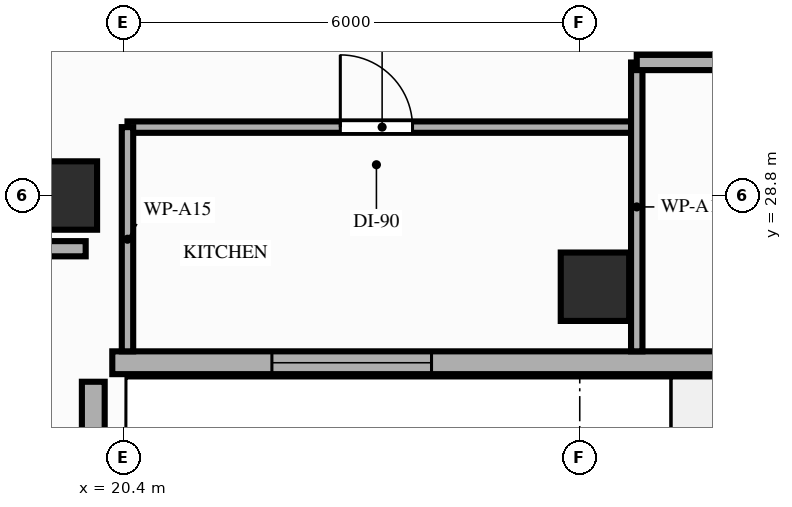
"""IFC4 building model, lengths in metres.
Left out: names, types, materials, properties, quantities, classifications, styles, units other than length and angle.
Written with IfcOpenShell. Run it as: python <this file> out.ifc"""

import sys

from ifc_helpers import new_model, si_unit, direction, frame, frame_2d, origin, origin_2d, place, context, subcontext, project, spatial, rectangle, extrude, element, fill, save


model = new_model("IFC4")
c1 = context("Model", 3, precision=1e-05, world=origin(), true_north=direction((0.0, 1.0)))
c2 = subcontext(c1, "Body", "Model", "MODEL_VIEW")
j1 = project(units=[si_unit("LENGTHUNIT", "METRE"), si_unit("PLANEANGLEUNIT", "RADIAN")], contexts=[c1])
p1 = place(None, origin())
s1 = spatial("IfcSite", under=j1, at=p1, CompositionType="ELEMENT")
p2 = place(p1, origin())
s2 = spatial("IfcBuilding", under=s1, at=p2, CompositionType="ELEMENT")
p3 = place(p2, frame((0.0, 0.0, 179.2)))
s3 = spatial("IfcBuildingStorey", under=s2, at=p3, CompositionType="ELEMENT", Elevation=179.2)
for number, where, z_axis, x_axis in (
    (1, (19.6, 28.8, 0.0), (0.0, 0.0, 1.0), (1.0, 0.0, 0.0)),
    (2, (26.6, 27.6, 0.0), (0.0, 0.0, 1.0), (1.0, 0.0, 0.0)),
):
    element("IfcColumn", number, at=place(p3, frame(where, z_axis=z_axis, x_axis=x_axis)), inside=s3, PredefinedType="COLUMN", context=c2, shape_type="SweptSolid", body=[
        extrude(rectangle(XDim=0.9, YDim=0.9, at=origin_2d()), origin(), (0.0, 0.0, 1.0), 3.2),
    ])
p4 = place(p3, frame((20.0, 8.8, 0.0), z_axis=(0.0, 0.0, 1.0), x_axis=(0.0, 1.0, 0.0)))
e3 = element("IfcWall", 3, at=p4, inside=s3, PredefinedType="STANDARD", context=c2, shape_type="SweptSolid", body=[
    extrude(rectangle(XDim=17.55, YDim=0.3, at=frame_2d((8.775, 0.0))), origin(), (0.0, 0.0, 1.0), 2.45),
])
p5 = place(p4, frame((5.12, 0.0, 0.85)))
e4 = element("IfcOpeningElement", 4, at=p5, cuts=e3, PredefinedType="OPENING", context=c2, shape_type="SweptSolid", body=[
    extrude(rectangle(XDim=2.1, YDim=1.35, at=frame_2d((1.05, 0.675))), frame((0.0, 0.16, 0.0), z_axis=(0.0, -1.0, 0.0), x_axis=(1.0, 0.0, 0.0)), (0.0, 0.0, 1.0), 0.32),
])
p6 = place(p4, frame((10.85, 0.0, 0.85)))
e5 = element("IfcOpeningElement", 5, at=p6, cuts=e3, PredefinedType="OPENING", context=c2, shape_type="SweptSolid", body=[
    extrude(rectangle(XDim=2.1, YDim=1.35, at=frame_2d((1.05, 0.675))), frame((0.0, 0.16, 0.0), z_axis=(0.0, -1.0, 0.0), x_axis=(1.0, 0.0, 0.0)), (0.0, 0.0, 1.0), 0.32),
])
p7 = place(p3, frame((20.25, 26.6, 0.0), z_axis=(0.0, 0.0, 1.0), x_axis=(1.0, 0.0, 0.0)))
e6 = element("IfcWall", 6, at=p7, inside=s3, PredefinedType="STANDARD", context=c2, shape_type="SweptSolid", body=[
    extrude(rectangle(XDim=21.35, YDim=0.3, at=frame_2d((10.675, 0.0))), origin(), (0.0, 0.0, 1.0), 2.71),
])
p8 = place(p7, frame((7.95, 0.0, 0.0)))
e7 = element("IfcOpeningElement", 7, at=p8, cuts=e6, PredefinedType="OPENING", context=c2, shape_type="SweptSolid", body=[
    extrude(rectangle(XDim=1.4, YDim=2.1, at=frame_2d((0.7, 1.05))), frame((0.0, 0.16, 0.0), z_axis=(0.0, -1.0, 0.0), x_axis=(1.0, 0.0, 0.0)), (0.0, 0.0, 1.0), 0.32),
])
p9 = place(p7, frame((17.73, 0.0, 0.85)))
e8 = element("IfcOpeningElement", 8, at=p9, cuts=e6, PredefinedType="OPENING", context=c2, shape_type="SweptSolid", body=[
    extrude(rectangle(XDim=2.1, YDim=1.61, at=frame_2d((1.05, 0.805))), frame((0.0, 0.16, 0.0), z_axis=(0.0, -1.0, 0.0), x_axis=(1.0, 0.0, 0.0)), (0.0, 0.0, 1.0), 0.32),
])
p10 = place(p7, frame((2.1, 0.0, 0.85)))
e9 = element("IfcOpeningElement", 9, at=p10, cuts=e6, PredefinedType="OPENING", context=c2, shape_type="SweptSolid", body=[
    extrude(rectangle(XDim=2.1, YDim=1.61, at=frame_2d((1.05, 0.805))), frame((0.0, 0.16, 0.0), z_axis=(0.0, -1.0, 0.0), x_axis=(1.0, 0.0, 0.0)), (0.0, 0.0, 1.0), 0.32),
])
p11 = place(p7, frame((13.5, 0.0, 0.85)))
e10 = element("IfcOpeningElement", 10, at=p11, cuts=e6, PredefinedType="OPENING", context=c2, shape_type="SweptSolid", body=[
    extrude(rectangle(XDim=2.1, YDim=1.61, at=frame_2d((1.05, 0.805))), frame((0.0, 0.16, 0.0), z_axis=(0.0, -1.0, 0.0), x_axis=(1.0, 0.0, 0.0)), (0.0, 0.0, 1.0), 0.32),
])
p12 = place(p3, frame((9.06, 28.1, 0.0), z_axis=(0.0, 0.0, 1.0), x_axis=(1.0, 0.0, 0.0)))
e11 = element("IfcWall", 11, at=p12, inside=s3, PredefinedType="PARTITIONING", context=c2, shape_type="SweptSolid", body=[
    extrude(rectangle(XDim=10.84, YDim=0.2, at=frame_2d((5.42, 0.0))), origin(), (0.0, 0.0, 1.0), 2.45),
])
p13 = place(p3, frame((20.45, 29.7, 0.0), z_axis=(0.0, 0.0, 1.0), x_axis=(1.0, 0.0, 0.0)))
e12 = element("IfcWall", 12, at=p13, inside=s3, PredefinedType="PARTITIONING", context=c2, shape_type="SweptSolid", body=[
    extrude(rectangle(XDim=6.7, YDim=0.15, at=frame_2d((3.35, 0.0))), origin(), (0.0, 0.0, 1.0), 3.02),
])
p14 = place(p13, frame((2.8, 0.0, 0.0)))
e13 = element("IfcOpeningElement", 13, at=p14, cuts=e12, PredefinedType="OPENING", context=c2, shape_type="SweptSolid", body=[
    extrude(rectangle(XDim=0.95, YDim=2.15, at=frame_2d((0.475, 1.075))), frame((0.0, 0.085, 0.0), z_axis=(0.0, -1.0, 0.0), x_axis=(1.0, 0.0, 0.0)), (0.0, 0.0, 1.0), 0.17),
])
p15 = place(p3, frame((20.45, 26.75, 0.0), z_axis=(0.0, 0.0, 1.0), x_axis=(0.0, 1.0, 0.0)))
e14 = element("IfcWall", 14, at=p15, inside=s3, PredefinedType="PARTITIONING", context=c2, shape_type="SweptSolid", body=[
    extrude(rectangle(XDim=2.95, YDim=0.15, at=frame_2d((1.475, 0.0))), origin(), (0.0, 0.0, 1.0), 2.45),
])
p16 = place(p3, frame((27.15, 26.75, 0.0), z_axis=(0.0, 0.0, 1.0), x_axis=(0.0, 1.0, 0.0)))
e15 = element("IfcWall", 15, at=p16, inside=s3, PredefinedType="PARTITIONING", context=c2, shape_type="SweptSolid", body=[
    extrude(rectangle(XDim=3.8, YDim=0.15, at=frame_2d((1.9, 0.0))), origin(), (0.0, 0.0, 1.0), 2.45),
])
p17 = place(p3, frame((27.15, 30.55, 0.0), z_axis=(0.0, 0.0, 1.0), x_axis=(1.0, 0.0, 0.0)))
e16 = element("IfcWall", 16, at=p17, inside=s3, PredefinedType="PARTITIONING", context=c2, shape_type="SweptSolid", body=[
    extrude(rectangle(XDim=9.45, YDim=0.2, at=frame_2d((4.725, 0.0))), origin(), (0.0, 0.0, 1.0), 2.45),
])
p18 = place(p17, frame((4.25, 0.0, 0.0)))
e17 = element("IfcOpeningElement", 17, at=p18, cuts=e16, PredefinedType="OPENING", context=c2, shape_type="SweptSolid", body=[
    extrude(rectangle(XDim=0.95, YDim=2.15, at=frame_2d((0.475, 1.075))), frame((0.0, 0.11, 0.0), z_axis=(0.0, -1.0, 0.0), x_axis=(1.0, 0.0, 0.0)), (0.0, 0.0, 1.0), 0.22),
])
p19 = place(p10, origin())
e18 = element("IfcWindow", 18, at=p19, inside=s3, PartitioningType="SINGLE_PANEL", PredefinedType="WINDOW", context=c2, shape_type="SweptSolid", body=[
    extrude(rectangle(XDim=2.1, YDim=1.61, at=frame_2d((1.05, 0.805))), frame((0.0, 0.03, 0.0), z_axis=(0.0, -1.0, 0.0), x_axis=(1.0, 0.0, 0.0)), (0.0, 0.0, 1.0), 0.06),
])
fill(e9, e18)
p20 = place(p14, origin())
e19 = element("IfcDoor", 19, at=p20, inside=s3, OperationType="SINGLE_SWING_LEFT", PredefinedType="DOOR", context=c2, shape_type="SweptSolid", body=[
    extrude(rectangle(XDim=0.95, YDim=2.15, at=frame_2d((0.475, 1.075))), frame((0.0, 0.025, 0.0), z_axis=(0.0, -1.0, 0.0), x_axis=(1.0, 0.0, 0.0)), (0.0, 0.0, 1.0), 0.05),
])
fill(e13, e19)
save(model, sys.argv[1])
